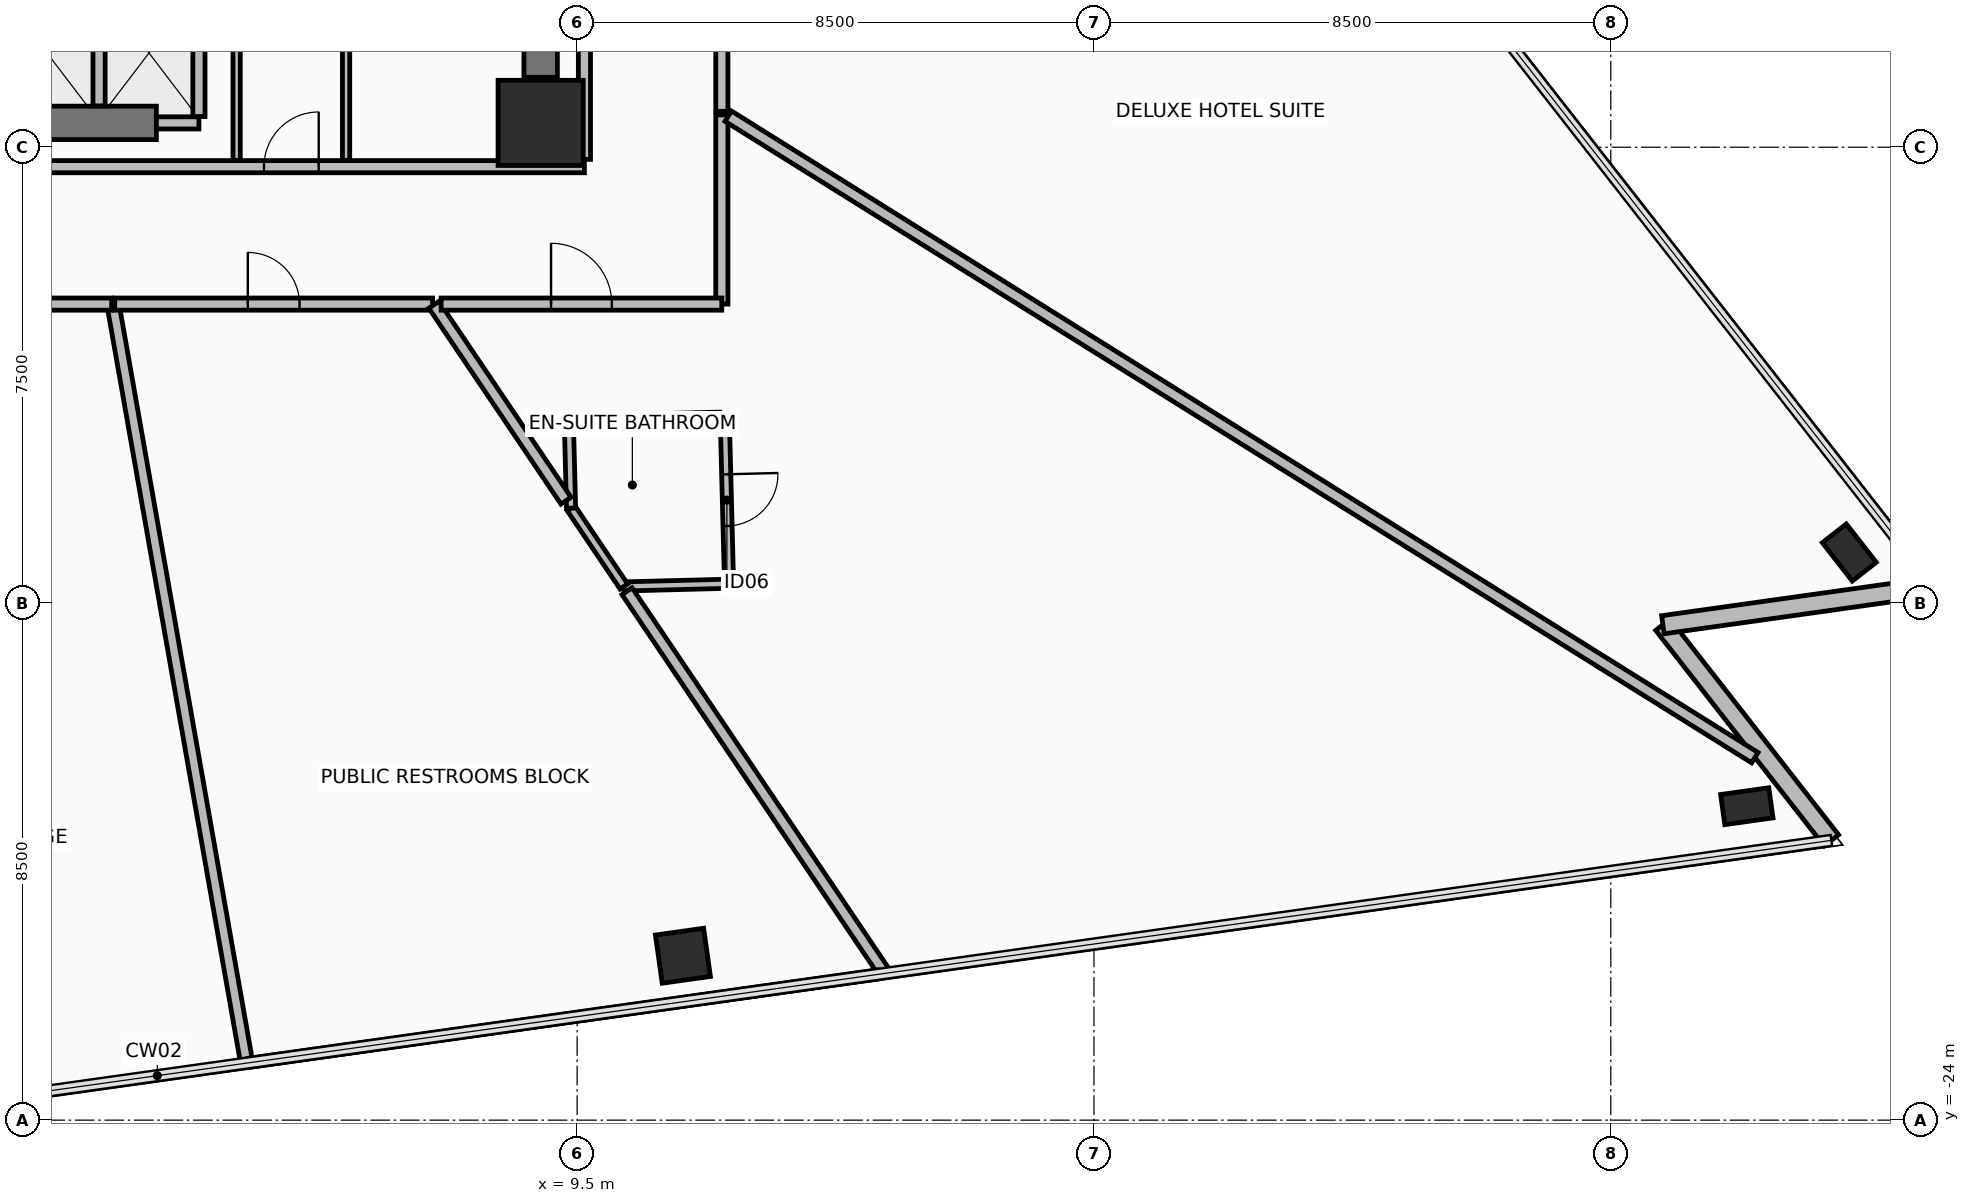
"""IFC4 building model, lengths in metres.
Left out: names, types, materials, properties, quantities, classifications, styles, units other than length and angle.
Written with IfcOpenShell. Run it as: python <this file> out.ifc"""

import sys

from ifc_helpers import new_model, si_unit, direction, frame, frame_2d, origin, origin_2d, place, context, subcontext, project, spatial, rectangle, hollow_rectangle, extrude, element, fill, save


model = new_model("IFC4")
c1 = context("Model", 3, precision=1e-05, world=origin(), true_north=direction((0.0, 1.0)))
c2 = subcontext(c1, "Body", "Model", "MODEL_VIEW")
j1 = project(units=[si_unit("LENGTHUNIT", "METRE"), si_unit("PLANEANGLEUNIT", "RADIAN")], contexts=[c1])
p1 = place(None, origin())
s1 = spatial("IfcSite", under=j1, at=p1, CompositionType="ELEMENT")
p2 = place(p1, origin())
s2 = spatial("IfcBuilding", under=s1, at=p2, CompositionType="ELEMENT")
p3 = place(p2, frame((0.0, 0.0, 67.3)))
s3 = spatial("IfcBuildingStorey", under=s2, at=p3, CompositionType="ELEMENT", Elevation=67.3)
p4 = place(p3, frame((8.9, -7.6, 0.0), z_axis=(0.0, 0.0, 1.0), x_axis=(1.0, 0.0, 0.0)))
e1 = element("IfcColumn", 1, at=p4, inside=s3, PredefinedType="COLUMN", context=c2, shape_type="SweptSolid", body=[
    extrude(rectangle(XDim=1.4, YDim=1.4, at=origin_2d()), origin(), (0.0, 0.0, 1.0), 3.45),
])
p5 = place(p3, frame((11.24, -21.296, 0.0), z_axis=(0.0, 0.0, 1.0), x_axis=(0.990268068742, 0.13917310096, 0.0)))
e2 = element("IfcColumn", 2, at=p5, inside=s3, PredefinedType="COLUMN", context=c2, shape_type="SweptSolid", body=[
    extrude(hollow_rectangle(XDim=0.8, YDim=0.8, WallThickness=0.045, at=origin_2d()), origin(), (0.0, 0.0, 1.0), 3.45),
])
for number, where, z_axis, x_axis in (
    (3, (28.737, -18.837, 0.0), (0.0, 0.0, 1.0), (0.99, 0.139, 0.0)),
    (4, (30.423, -14.665, 0.0), (0.0, 0.0, 1.0), (-0.616, 0.788, 0.0)),
):
    element("IfcColumn", number, at=place(p3, frame(where, z_axis=z_axis, x_axis=x_axis)), inside=s3, PredefinedType="COLUMN", context=c2, shape_type="SweptSolid", body=[
        extrude(hollow_rectangle(XDim=0.5, YDim=0.8, WallThickness=0.04, at=origin_2d()), origin(), (0.0, 0.0, 1.0), 3.45),
    ])
p6 = place(p3, frame((30.128, -19.399, 0.0), z_axis=(0.0, 0.0, 1.0), x_axis=(-0.615621932091, 0.78804164657, 0.0)))
e5 = element("IfcWall", 5, at=p6, inside=s3, PredefinedType="STANDARD", context=c2, shape_type="SweptSolid", body=[
    extrude(rectangle(XDim=4.5, YDim=0.3, at=frame_2d((2.25, 0.0))), origin(), (0.0, 0.0, 1.0), 2.47),
])
p7 = place(p3, frame((27.357, -15.853, 0.0), z_axis=(0.0, 0.0, 1.0), x_axis=(0.990269200152, 0.139165050317, 0.0)))
e6 = element("IfcWall", 6, at=p7, inside=s3, PredefinedType="STANDARD", context=c2, shape_type="SweptSolid", body=[
    extrude(rectangle(XDim=4.5, YDim=0.3, at=frame_2d((2.25, 0.0))), origin(), (0.0, 0.0, 1.0), 2.47),
])
p8 = place(p3, frame((-2.8, -7.6, 0.0), z_axis=(0.0, 0.0, 1.0), x_axis=(1.0, 0.0, 0.0)))
e7 = element("IfcWall", 7, at=p8, inside=s3, PredefinedType="SHEAR", context=c2, shape_type="SweptSolid", body=[
    extrude(rectangle(XDim=5.38, YDim=0.55, at=frame_2d((2.69, 0.0))), origin(), (0.0, 0.0, 1.0), 3.275),
])
p9 = place(p3, frame((8.9, -6.85, 0.0), z_axis=(0.0, 0.0, 1.0), x_axis=(0.0, 1.0, 0.0)))
e8 = element("IfcWall", 8, at=p9, inside=s3, PredefinedType="SHEAR", context=c2, shape_type="SweptSolid", body=[
    extrude(rectangle(XDim=10.7, YDim=0.55, at=frame_2d((5.35, 0.0))), origin(), (0.0, 0.0, 1.0), 3.275),
])
p10 = place(p3, frame((-9.62, -8.32, 0.0), z_axis=(0.0, 0.0, 1.0), x_axis=(1.0, 0.0, 0.0)))
e9 = element("IfcWall", 9, at=p10, inside=s3, PredefinedType="PARTITIONING", context=c2, shape_type="SweptSolid", body=[
    extrude(rectangle(XDim=19.24, YDim=0.2, at=frame_2d((9.62, 0.0))), origin(), (0.0, 0.0, 1.0), 2.67),
])
p11 = place(p10, frame((13.97, 0.0, 0.0)))
e10 = element("IfcOpeningElement", 10, at=p11, cuts=e9, PredefinedType="OPENING", context=c2, shape_type="SweptSolid", body=[
    extrude(rectangle(XDim=0.9, YDim=2.1, at=frame_2d((0.45, 1.05))), frame((0.0, 0.11, 0.0), z_axis=(0.0, -1.0, 0.0), x_axis=(1.0, 0.0, 0.0)), (0.0, 0.0, 1.0), 0.22),
])
p12 = place(p3, frame((9.62, -8.2, 0.0), z_axis=(0.0, 0.0, 1.0), x_axis=(0.0, 1.0, 0.0)))
e11 = element("IfcWall", 11, at=p12, inside=s3, PredefinedType="PARTITIONING", context=c2, shape_type="SweptSolid", body=[
    extrude(rectangle(XDim=16.4, YDim=0.2, at=frame_2d((8.2, 0.0))), origin(), (0.0, 0.0, 1.0), 2.67),
])
p13 = place(p12, frame((12.65, 0.0, 0.0)))
e12 = element("IfcOpeningElement", 12, at=p13, cuts=e11, PredefinedType="OPENING", context=c2, shape_type="SweptSolid", body=[
    extrude(rectangle(XDim=1.1, YDim=2.15, at=frame_2d((0.55, 1.075))), frame((0.0, 0.11, 0.0), z_axis=(0.0, -1.0, 0.0), x_axis=(1.0, 0.0, 0.0)), (0.0, 0.0, 1.0), 0.22),
])
p14 = place(p3, frame((1.637, -7.32, 0.0), z_axis=(0.0, 0.0, 1.0), x_axis=(0.0, 1.0, 0.0)))
e13 = element("IfcWall", 13, at=p14, inside=s3, PredefinedType="PARTITIONING", context=c2, shape_type="SweptSolid", body=[
    extrude(rectangle(XDim=1.89, YDim=0.2, at=frame_2d((0.945, 0.0))), origin(), (0.0, 0.0, 1.0), 3.275),
])
p15 = place(p3, frame((2.58, -7.6, 0.0), z_axis=(0.0, 0.0, 1.0), x_axis=(1.0, 0.0, 0.0)))
e14 = element("IfcWall", 14, at=p15, inside=s3, PredefinedType="PARTITIONING", context=c2, shape_type="SweptSolid", body=[
    extrude(rectangle(XDim=0.7, YDim=0.2, at=frame_2d((0.35, 0.0))), origin(), (0.0, 0.0, 1.0), 2.47),
])
p16 = place(p3, frame((3.28, -7.495, 0.0), z_axis=(0.0, 0.0, 1.0), x_axis=(0.0, 1.0, 0.0)))
e15 = element("IfcWall", 15, at=p16, inside=s3, PredefinedType="PARTITIONING", context=c2, shape_type="SweptSolid", body=[
    extrude(rectangle(XDim=2.065, YDim=0.2, at=frame_2d((1.033, 0.0))), origin(), (0.0, 0.0, 1.0), 2.47),
])
p17 = place(p3, frame((5.7, -8.215, 0.0), z_axis=(0.0, 0.0, 1.0), x_axis=(0.0, 1.0, 0.0)))
e16 = element("IfcWall", 16, at=p17, inside=s3, PredefinedType="PARTITIONING", context=c2, shape_type="SweptSolid", body=[
    extrude(rectangle(XDim=2.615, YDim=0.12, at=frame_2d((1.308, 0.0))), origin(), (0.0, 0.0, 1.0), 2.47),
])
p18 = place(p3, frame((3.9, -5.665, 0.0), z_axis=(0.0, 0.0, 1.0), x_axis=(0.0, -1.0, 0.0)))
e17 = element("IfcWall", 17, at=p18, inside=s3, PredefinedType="PARTITIONING", context=c2, shape_type="SweptSolid", body=[
    extrude(rectangle(XDim=2.55, YDim=0.12, at=frame_2d((1.275, 0.0))), origin(), (0.0, 0.0, 1.0), 2.47),
])
p19 = place(p3, frame((11.927, -12.429, 0.0), z_axis=(0.0, 0.0, 1.0), x_axis=(0.025746347005, -0.999668507864, 0.0)))
e18 = element("IfcWall", 18, at=p19, inside=s3, PredefinedType="PARTITIONING", context=c2, shape_type="SweptSolid", body=[
    extrude(rectangle(XDim=2.75, YDim=0.15, at=frame_2d((1.375, 0.0))), origin(), (0.0, 0.0, 1.0), 2.87),
])
p20 = place(p19, frame((0.95, 0.0, 0.0)))
e19 = element("IfcOpeningElement", 19, at=p20, cuts=e18, PredefinedType="OPENING", context=c2, shape_type="SweptSolid", body=[
    extrude(rectangle(XDim=0.85, YDim=2.1, at=frame_2d((0.425, 1.05))), frame((0.0, 0.085, 0.0), z_axis=(0.0, -1.0, 0.0), x_axis=(1.0, 0.0, 0.0)), (0.0, 0.0, 1.0), 0.17),
])
p21 = place(p3, frame((11.998, -15.178, 0.0), z_axis=(0.0, 0.0, 1.0), x_axis=(-0.999670410654, -0.025672359918, 0.0)))
e20 = element("IfcWall", 20, at=p21, inside=s3, PredefinedType="PARTITIONING", context=c2, shape_type="SweptSolid", body=[
    extrude(rectangle(XDim=1.731, YDim=0.15, at=frame_2d((0.865, 0.0))), origin(), (0.0, 0.0, 1.0), 2.67),
])
p22 = place(p3, frame((10.268, -15.223, 0.0), z_axis=(0.0, 0.0, 1.0), x_axis=(-0.559229675695, 0.82901276819, 0.0)))
e21 = element("IfcWall", 21, at=p22, inside=s3, PredefinedType="PARTITIONING", context=c2, shape_type="SweptSolid", body=[
    extrude(rectangle(XDim=1.552, YDim=0.15, at=frame_2d((0.776, 0.0))), origin(), (0.0, 0.0, 1.0), 2.67),
])
p23 = place(p3, frame((9.4, -13.936, 0.0), z_axis=(0.0, 0.0, 1.0), x_axis=(-0.025745445057, 0.999668531094, 0.0)))
e22 = element("IfcWall", 22, at=p23, inside=s3, PredefinedType="PARTITIONING", context=c2, shape_type="SweptSolid", body=[
    extrude(rectangle(XDim=1.441, YDim=0.15, at=frame_2d((0.721, 0.0))), origin(), (0.0, 0.0, 1.0), 3.275),
])
p24 = place(p3, frame((9.443, -12.493, 0.0), z_axis=(0.0, 0.0, 1.0), x_axis=(0.999667618691, 0.025780848324, 0.0)))
e23 = element("IfcWall", 23, at=p24, inside=s3, PredefinedType="PARTITIONING", context=c2, shape_type="SweptSolid", body=[
    extrude(rectangle(XDim=2.405, YDim=0.15, at=frame_2d((1.203, 0.0))), origin(), (0.0, 0.0, 1.0), 2.67),
])
p25 = place(p3, frame((4.062, -23.038, 0.0), z_axis=(0.0, 0.0, 1.0), x_axis=(-0.173658422676, 0.984805946486, 0.0)))
e24 = element("IfcWall", 24, at=p25, inside=s3, PredefinedType="PARTITIONING", context=c2, shape_type="SweptSolid", body=[
    extrude(rectangle(XDim=12.62, YDim=0.2, at=frame_2d((6.31, 0.0))), origin(), (0.0, 0.0, 1.0), 2.47),
])
p26 = place(p3, frame((1.895, -10.58, 0.0), z_axis=(0.0, 0.0, 1.0), x_axis=(1.0, 0.0, 0.0)))
e25 = element("IfcWall", 25, at=p26, inside=s3, PredefinedType="PARTITIONING", context=c2, shape_type="SweptSolid", body=[
    extrude(rectangle(XDim=5.228, YDim=0.2, at=frame_2d((2.614, 0.0))), origin(), (0.0, 0.0, 1.0), 3.275),
])
p27 = place(p26, frame((2.189, 0.0, 0.0)))
e26 = element("IfcOpeningElement", 26, at=p27, cuts=e25, PredefinedType="OPENING", context=c2, shape_type="SweptSolid", body=[
    extrude(rectangle(XDim=0.85, YDim=2.1, at=frame_2d((0.425, 1.05))), frame((0.0, 0.11, 0.0), z_axis=(0.0, -1.0, 0.0), x_axis=(1.0, 0.0, 0.0)), (0.0, 0.0, 1.0), 0.22),
])
p28 = place(p3, frame((7.144, -10.591, 0.0), z_axis=(0.0, 0.0, 1.0), x_axis=(0.559171794076, -0.829051810631, 0.0)))
e27 = element("IfcWall", 27, at=p28, inside=s3, PredefinedType="PARTITIONING", context=c2, shape_type="SweptSolid", body=[
    extrude(rectangle(XDim=3.886, YDim=0.2, at=frame_2d((1.943, 0.0))), origin(), (0.0, 0.0, 1.0), 3.275),
])
p29 = place(p3, frame((10.321, -15.302, 0.0), z_axis=(0.0, 0.0, 1.0), x_axis=(0.559202924042, -0.829030813506, 0.0)))
e28 = element("IfcWall", 28, at=p29, inside=s3, PredefinedType="PARTITIONING", context=c2, shape_type="SweptSolid", body=[
    extrude(rectangle(XDim=7.581, YDim=0.2, at=frame_2d((3.791, 0.0))), origin(), (0.0, 0.0, 1.0), 2.47),
])
p30 = place(p3, frame((14.445, -21.603, 0.0), z_axis=(0.0, 0.0, 1.0), x_axis=(-0.990270056923, -0.139158953581, 0.0)))
e29 = element("IfcWall", 29, at=p30, inside=s3, PredefinedType="PARTITIONING", context=c2, shape_type="SweptSolid", body=[
    extrude(rectangle(XDim=10.456, YDim=0.15, at=frame_2d((5.228, 0.0))), origin(), (0.0, 0.0, 1.0), 3.275),
])
p31 = place(p3, frame((-2.618, -10.58, 0.0), z_axis=(0.0, 0.0, 1.0), x_axis=(1.0, 0.0, 0.0)))
e30 = element("IfcWall", 30, at=p31, inside=s3, PredefinedType="PARTITIONING", context=c2, shape_type="SweptSolid", body=[
    extrude(rectangle(XDim=4.463, YDim=0.2, at=frame_2d((2.231, 0.0))), origin(), (0.0, 0.0, 1.0), 3.275),
])
p32 = place(p31, frame((1.631, 0.0, 0.0)))
e31 = element("IfcOpeningElement", 31, at=p32, cuts=e30, PredefinedType="OPENING", context=c2, shape_type="SweptSolid", body=[
    extrude(rectangle(XDim=1.2, YDim=2.15, at=frame_2d((0.6, 1.075))), frame((0.0, 0.11, 0.0), z_axis=(0.0, -1.0, 0.0), x_axis=(1.0, 0.0, 0.0)), (0.0, 0.0, 1.0), 0.22),
])
p33 = place(p3, frame((11.88, -10.579, 0.0), z_axis=(0.0, 0.0, 1.0), x_axis=(0.0, 1.0, 0.0)))
e32 = element("IfcWall", 32, at=p33, inside=s3, PredefinedType="PARTITIONING", context=c2, shape_type="SweptSolid", body=[
    extrude(rectangle(XDim=3.111, YDim=0.2, at=frame_2d((1.555, 0.0))), origin(), (0.0, 0.0, 1.0), 2.67),
])
p34 = place(p3, frame((11.985, -7.489, 0.0), z_axis=(0.0, 0.0, 1.0), x_axis=(0.848049281921, -0.529917366608, 0.0)))
e33 = element("IfcWall", 33, at=p34, inside=s3, PredefinedType="PARTITIONING", context=c2, shape_type="SweptSolid", body=[
    extrude(rectangle(XDim=19.908, YDim=0.2, at=frame_2d((9.954, 0.0))), origin(), (0.0, 0.0, 1.0), 2.47),
])
p35 = place(p3, frame((7.263, -10.58, 0.0), z_axis=(0.0, 0.0, 1.0), x_axis=(1.0, 0.0, 0.0)))
e34 = element("IfcWall", 34, at=p35, inside=s3, PredefinedType="PARTITIONING", context=c2, shape_type="SweptSolid", body=[
    extrude(rectangle(XDim=4.616, YDim=0.2, at=frame_2d((2.308, 0.0))), origin(), (0.0, 0.0, 1.0), 2.67),
])
p36 = place(p35, frame((1.808, 0.0, 0.0)))
e35 = element("IfcOpeningElement", 35, at=p36, cuts=e34, PredefinedType="OPENING", context=c2, shape_type="SweptSolid", body=[
    extrude(rectangle(XDim=1.0, YDim=2.15, at=frame_2d((0.5, 1.075))), frame((0.0, 0.11, 0.0), z_axis=(0.0, -1.0, 0.0), x_axis=(1.0, 0.0, 0.0)), (0.0, 0.0, 1.0), 0.22),
])
p37 = place(p3, frame((11.88, -7.41, 0.0), z_axis=(0.0, 0.0, 1.0), x_axis=(0.0, 1.0, 0.0)))
e36 = element("IfcWall", 36, at=p37, inside=s3, PredefinedType="PARTITIONING", context=c2, shape_type="SweptSolid", body=[
    extrude(rectangle(XDim=5.711, YDim=0.2, at=frame_2d((2.855, 0.0))), origin(), (0.0, 0.0, 1.0), 2.67),
])
p38 = place(p37, frame((2.356, 0.0, 0.0)))
e37 = element("IfcOpeningElement", 37, at=p38, cuts=e36, PredefinedType="OPENING", context=c2, shape_type="SweptSolid", body=[
    extrude(rectangle(XDim=1.0, YDim=2.15, at=frame_2d((0.5, 1.075))), frame((0.0, 0.11, 0.0), z_axis=(0.0, -1.0, 0.0), x_axis=(1.0, 0.0, 0.0)), (0.0, 0.0, 1.0), 0.22),
])
p39 = place(p11, frame((0.9, 0.0, 0.0), z_axis=(0.0, 0.0, 1.0), x_axis=(-1.0, 0.0, 0.0)))
e38 = element("IfcDoor", 38, at=p39, inside=s3, OperationType="SINGLE_SWING_LEFT", PredefinedType="DOOR", context=c2, shape_type="SweptSolid", body=[
    extrude(rectangle(XDim=0.9, YDim=2.1, at=frame_2d((0.45, 1.05))), frame((0.0, 0.025, 0.0), z_axis=(0.0, -1.0, 0.0), x_axis=(1.0, 0.0, 0.0)), (0.0, 0.0, 1.0), 0.05),
])
fill(e10, e38)
p40 = place(p20, origin())
e39 = element("IfcDoor", 39, at=p40, inside=s3, OperationType="SINGLE_SWING_RIGHT", PredefinedType="DOOR", context=c2, shape_type="SweptSolid", body=[
    extrude(rectangle(XDim=0.85, YDim=2.1, at=frame_2d((0.425, 1.05))), frame((0.0, 0.025, 0.0), z_axis=(0.0, -1.0, 0.0), x_axis=(1.0, 0.0, 0.0)), (0.0, 0.0, 1.0), 0.05),
])
fill(e19, e39)
p41 = place(p27, origin())
e40 = element("IfcDoor", 40, at=p41, inside=s3, OperationType="SINGLE_SWING_RIGHT", PredefinedType="DOOR", context=c2, shape_type="SweptSolid", body=[
    extrude(rectangle(XDim=0.85, YDim=2.1, at=frame_2d((0.425, 1.05))), frame((0.0, 0.025, 0.0), z_axis=(0.0, -1.0, 0.0), x_axis=(1.0, 0.0, 0.0)), (0.0, 0.0, 1.0), 0.05),
])
fill(e26, e40)
p42 = place(p36, origin())
e41 = element("IfcDoor", 41, at=p42, inside=s3, OperationType="SINGLE_SWING_LEFT", PredefinedType="DOOR", context=c2, shape_type="SweptSolid", body=[
    extrude(rectangle(XDim=1.0, YDim=2.15, at=frame_2d((0.5, 1.075))), frame((0.0, 0.025, 0.0), z_axis=(0.0, -1.0, 0.0), x_axis=(1.0, 0.0, 0.0)), (0.0, 0.0, 1.0), 0.05),
])
fill(e35, e41)
save(model, sys.argv[1])
